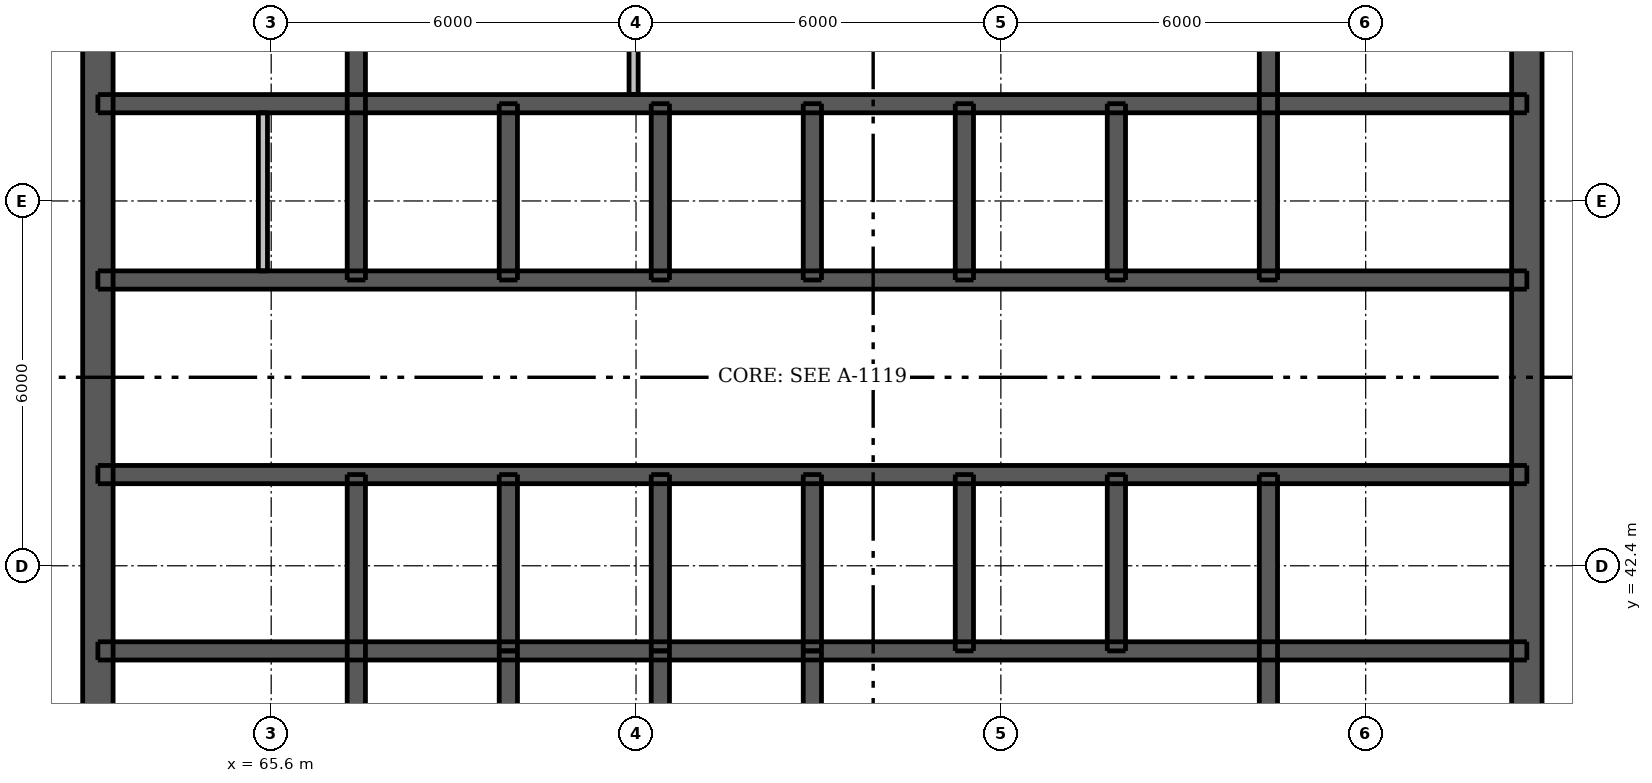
"""IFC4 building model, lengths in metres.
Left out: names, types, materials, properties, quantities, classifications, styles, units other than length and angle.
Written with IfcOpenShell. Run it as: python <this file> out.ifc"""

import sys

from ifc_helpers import new_model, si_unit, direction, frame, frame_2d, origin, place, context, subcontext, project, spatial, rectangle, extrude, element, fill, save


model = new_model("IFC4")
c1 = context("Model", 3, precision=1e-05, world=origin(), true_north=direction((0.0, 1.0)))
c2 = subcontext(c1, "Body", "Model", "MODEL_VIEW")
j1 = project(units=[si_unit("LENGTHUNIT", "METRE"), si_unit("PLANEANGLEUNIT", "RADIAN")], contexts=[c1])
p1 = place(None, origin())
s1 = spatial("IfcSite", under=j1, at=p1, CompositionType="ELEMENT")
p2 = place(p1, origin())
s2 = spatial("IfcBuilding", under=s1, at=p2, CompositionType="ELEMENT")
p3 = place(p2, frame((0.0, 0.0, 268.6)))
s3 = spatial("IfcBuildingStorey", under=s2, at=p3, CompositionType="ELEMENT", Elevation=268.6)
p4 = place(p3, frame((62.75, 33.5, 0.0), z_axis=(0.0, 0.0, 1.0), x_axis=(0.0, 1.0, 0.0)))
e1 = element("IfcWall", 1, at=p4, inside=s3, PredefinedType="SHEAR", context=c2, shape_type="SweptSolid", body=[
    extrude(rectangle(XDim=24.0, YDim=0.5, at=frame_2d((12.0, 0.0))), origin(), (0.0, 0.0, 1.0), 3.05),
])
p5 = place(p4, frame((11.2, 0.0, 0.0)))
e2 = element("IfcOpeningElement", 2, at=p5, cuts=e1, PredefinedType="OPENING", context=c2, shape_type="SweptSolid", body=[
    extrude(rectangle(XDim=1.6, YDim=2.1, at=frame_2d((0.8, 1.05))), frame((0.0, 0.26, 0.0), z_axis=(0.0, -1.0, 0.0), x_axis=(1.0, 0.0, 0.0)), (0.0, 0.0, 1.0), 0.52),
])
p6 = place(p3, frame((86.25, 33.5, 0.0), z_axis=(0.0, 0.0, 1.0), x_axis=(0.0, 1.0, 0.0)))
e3 = element("IfcWall", 3, at=p6, inside=s3, PredefinedType="SHEAR", context=c2, shape_type="SweptSolid", body=[
    extrude(rectangle(XDim=24.0, YDim=0.5, at=frame_2d((12.0, 0.0))), origin(), (0.0, 0.0, 1.0), 3.05),
])
p7 = place(p6, frame((11.2, 0.0, 0.0)))
e4 = element("IfcOpeningElement", 4, at=p7, cuts=e3, PredefinedType="OPENING", context=c2, shape_type="SweptSolid", body=[
    extrude(rectangle(XDim=1.6, YDim=2.1, at=frame_2d((0.8, 1.05))), frame((0.0, 0.26, 0.0), z_axis=(0.0, -1.0, 0.0), x_axis=(1.0, 0.0, 0.0)), (0.0, 0.0, 1.0), 0.52),
])
p8 = place(p3, frame((62.75, 41.0, 0.0), z_axis=(0.0, 0.0, 1.0), x_axis=(1.0, 0.0, 0.0)))
e5 = element("IfcWall", 5, at=p8, inside=s3, PredefinedType="SHEAR", context=c2, shape_type="SweptSolid", body=[
    extrude(rectangle(XDim=23.5, YDim=0.3, at=frame_2d((11.75, 0.0))), origin(), (0.0, 0.0, 1.0), 3.05),
])
p9 = place(p3, frame((62.75, 43.9, 0.0), z_axis=(0.0, 0.0, 1.0), x_axis=(1.0, 0.0, 0.0)))
e6 = element("IfcWall", 6, at=p9, inside=s3, PredefinedType="SHEAR", context=c2, shape_type="SweptSolid", body=[
    extrude(rectangle(XDim=23.5, YDim=0.3, at=frame_2d((11.75, 0.0))), origin(), (0.0, 0.0, 1.0), 3.05),
])
p10 = place(p9, frame((1.725, 0.0, 0.0)))
e7 = element("IfcOpeningElement", 7, at=p10, cuts=e6, PredefinedType="OPENING", context=c2, shape_type="SweptSolid", body=[
    extrude(rectangle(XDim=0.9, YDim=2.1, at=frame_2d((0.45, 1.05))), frame((0.0, 0.16, 0.0), z_axis=(0.0, -1.0, 0.0), x_axis=(1.0, 0.0, 0.0)), (0.0, 0.0, 1.0), 0.32),
])
p11 = place(p9, frame((20.875, 0.0, 0.0)))
e8 = element("IfcOpeningElement", 8, at=p11, cuts=e6, PredefinedType="OPENING", context=c2, shape_type="SweptSolid", body=[
    extrude(rectangle(XDim=0.9, YDim=2.1, at=frame_2d((0.45, 1.05))), frame((0.0, 0.16, 0.0), z_axis=(0.0, -1.0, 0.0), x_axis=(1.0, 0.0, 0.0)), (0.0, 0.0, 1.0), 0.32),
])
p12 = place(p9, frame((7.55, 0.0, 0.0)))
e9 = element("IfcOpeningElement", 9, at=p12, cuts=e6, PredefinedType="OPENING", context=c2, shape_type="SweptSolid", body=[
    extrude(rectangle(XDim=0.9, YDim=2.1, at=frame_2d((0.45, 1.05))), frame((0.0, 0.16, 0.0), z_axis=(0.0, -1.0, 0.0), x_axis=(1.0, 0.0, 0.0)), (0.0, 0.0, 1.0), 0.32),
])
p13 = place(p9, frame((10.05, 0.0, 0.0)))
e10 = element("IfcOpeningElement", 10, at=p13, cuts=e6, PredefinedType="OPENING", context=c2, shape_type="SweptSolid", body=[
    extrude(rectangle(XDim=0.9, YDim=2.1, at=frame_2d((0.45, 1.05))), frame((0.0, 0.16, 0.0), z_axis=(0.0, -1.0, 0.0), x_axis=(1.0, 0.0, 0.0)), (0.0, 0.0, 1.0), 0.32),
])
p14 = place(p9, frame((15.05, 0.0, 0.0)))
e11 = element("IfcOpeningElement", 11, at=p14, cuts=e6, PredefinedType="OPENING", context=c2, shape_type="SweptSolid", body=[
    extrude(rectangle(XDim=0.9, YDim=2.1, at=frame_2d((0.45, 1.05))), frame((0.0, 0.16, 0.0), z_axis=(0.0, -1.0, 0.0), x_axis=(1.0, 0.0, 0.0)), (0.0, 0.0, 1.0), 0.32),
])
p15 = place(p9, frame((17.55, 0.0, 0.0)))
e12 = element("IfcOpeningElement", 12, at=p15, cuts=e6, PredefinedType="OPENING", context=c2, shape_type="SweptSolid", body=[
    extrude(rectangle(XDim=0.9, YDim=2.1, at=frame_2d((0.45, 1.05))), frame((0.0, 0.16, 0.0), z_axis=(0.0, -1.0, 0.0), x_axis=(1.0, 0.0, 0.0)), (0.0, 0.0, 1.0), 0.32),
])
p16 = place(p3, frame((62.75, 47.1, 0.0), z_axis=(0.0, 0.0, 1.0), x_axis=(1.0, 0.0, 0.0)))
e13 = element("IfcWall", 13, at=p16, inside=s3, PredefinedType="SHEAR", context=c2, shape_type="SweptSolid", body=[
    extrude(rectangle(XDim=23.5, YDim=0.3, at=frame_2d((11.75, 0.0))), origin(), (0.0, 0.0, 1.0), 3.05),
])
p17 = place(p16, frame((1.032, 0.0, 0.0)))
e14 = element("IfcOpeningElement", 14, at=p17, cuts=e13, PredefinedType="OPENING", context=c2, shape_type="SweptSolid", body=[
    extrude(rectangle(XDim=0.9, YDim=2.1, at=frame_2d((0.45, 1.05))), frame((0.0, 0.16, 0.0), z_axis=(0.0, -1.0, 0.0), x_axis=(1.0, 0.0, 0.0)), (0.0, 0.0, 1.0), 0.32),
])
p18 = place(p16, frame((3.007, 0.0, 0.0)))
e15 = element("IfcOpeningElement", 15, at=p18, cuts=e13, PredefinedType="OPENING", context=c2, shape_type="SweptSolid", body=[
    extrude(rectangle(XDim=0.8, YDim=2.1, at=frame_2d((0.4, 1.05))), frame((0.0, 0.16, 0.0), z_axis=(0.0, -1.0, 0.0), x_axis=(1.0, 0.0, 0.0)), (0.0, 0.0, 1.0), 0.32),
])
p19 = place(p16, frame((20.875, 0.0, 0.0)))
e16 = element("IfcOpeningElement", 16, at=p19, cuts=e13, PredefinedType="OPENING", context=c2, shape_type="SweptSolid", body=[
    extrude(rectangle(XDim=0.9, YDim=2.1, at=frame_2d((0.45, 1.05))), frame((0.0, 0.16, 0.0), z_axis=(0.0, -1.0, 0.0), x_axis=(1.0, 0.0, 0.0)), (0.0, 0.0, 1.0), 0.32),
])
p20 = place(p16, frame((4.95, 0.0, 0.0)))
e17 = element("IfcOpeningElement", 17, at=p20, cuts=e13, PredefinedType="OPENING", context=c2, shape_type="SweptSolid", body=[
    extrude(rectangle(XDim=1.1, YDim=2.1, at=frame_2d((0.55, 1.05))), frame((0.0, 0.16, 0.0), z_axis=(0.0, -1.0, 0.0), x_axis=(1.0, 0.0, 0.0)), (0.0, 0.0, 1.0), 0.32),
])
p21 = place(p16, frame((7.45, 0.0, 0.0)))
e18 = element("IfcOpeningElement", 18, at=p21, cuts=e13, PredefinedType="OPENING", context=c2, shape_type="SweptSolid", body=[
    extrude(rectangle(XDim=1.1, YDim=2.1, at=frame_2d((0.55, 1.05))), frame((0.0, 0.16, 0.0), z_axis=(0.0, -1.0, 0.0), x_axis=(1.0, 0.0, 0.0)), (0.0, 0.0, 1.0), 0.32),
])
p22 = place(p16, frame((9.95, 0.0, 0.0)))
e19 = element("IfcOpeningElement", 19, at=p22, cuts=e13, PredefinedType="OPENING", context=c2, shape_type="SweptSolid", body=[
    extrude(rectangle(XDim=1.1, YDim=2.1, at=frame_2d((0.55, 1.05))), frame((0.0, 0.16, 0.0), z_axis=(0.0, -1.0, 0.0), x_axis=(1.0, 0.0, 0.0)), (0.0, 0.0, 1.0), 0.32),
])
p23 = place(p16, frame((12.45, 0.0, 0.0)))
e20 = element("IfcOpeningElement", 20, at=p23, cuts=e13, PredefinedType="OPENING", context=c2, shape_type="SweptSolid", body=[
    extrude(rectangle(XDim=1.1, YDim=2.1, at=frame_2d((0.55, 1.05))), frame((0.0, 0.16, 0.0), z_axis=(0.0, -1.0, 0.0), x_axis=(1.0, 0.0, 0.0)), (0.0, 0.0, 1.0), 0.32),
])
p24 = place(p16, frame((14.95, 0.0, 0.0)))
e21 = element("IfcOpeningElement", 21, at=p24, cuts=e13, PredefinedType="OPENING", context=c2, shape_type="SweptSolid", body=[
    extrude(rectangle(XDim=1.1, YDim=2.1, at=frame_2d((0.55, 1.05))), frame((0.0, 0.16, 0.0), z_axis=(0.0, -1.0, 0.0), x_axis=(1.0, 0.0, 0.0)), (0.0, 0.0, 1.0), 0.32),
])
p25 = place(p16, frame((17.45, 0.0, 0.0)))
e22 = element("IfcOpeningElement", 22, at=p25, cuts=e13, PredefinedType="OPENING", context=c2, shape_type="SweptSolid", body=[
    extrude(rectangle(XDim=1.1, YDim=2.1, at=frame_2d((0.55, 1.05))), frame((0.0, 0.16, 0.0), z_axis=(0.0, -1.0, 0.0), x_axis=(1.0, 0.0, 0.0)), (0.0, 0.0, 1.0), 0.32),
])
p26 = place(p3, frame((62.75, 50.0, 0.0), z_axis=(0.0, 0.0, 1.0), x_axis=(1.0, 0.0, 0.0)))
e23 = element("IfcWall", 23, at=p26, inside=s3, PredefinedType="SHEAR", context=c2, shape_type="SweptSolid", body=[
    extrude(rectangle(XDim=23.5, YDim=0.3, at=frame_2d((11.75, 0.0))), origin(), (0.0, 0.0, 1.0), 3.05),
])
p27 = place(p3, frame((67.0, 33.75, 0.0), z_axis=(0.0, 0.0, 1.0), x_axis=(0.0, 1.0, 0.0)))
e24 = element("IfcWall", 24, at=p27, inside=s3, PredefinedType="SHEAR", context=c2, shape_type="SweptSolid", body=[
    extrude(rectangle(XDim=10.15, YDim=0.3, at=frame_2d((5.075, 0.0))), origin(), (0.0, 0.0, 1.0), 3.05),
])
p28 = place(p27, frame((0.45, 0.0, 0.0)))
e25 = element("IfcOpeningElement", 25, at=p28, cuts=e24, PredefinedType="OPENING", context=c2, shape_type="SweptSolid", body=[
    extrude(rectangle(XDim=1.1, YDim=2.1, at=frame_2d((0.55, 1.05))), frame((0.0, 0.16, 0.0), z_axis=(0.0, -1.0, 0.0), x_axis=(1.0, 0.0, 0.0)), (0.0, 0.0, 1.0), 0.32),
])
for number, where, z_axis, x_axis in (
    (26, (67.0, 47.1, 0.0), (0.0, 0.0, 1.0), (0.0, 1.0, 0.0)),
    (27, (82.0, 33.75, 0.0), (0.0, 0.0, 1.0), (0.0, 1.0, 0.0)),
    (28, (82.0, 47.1, 0.0), (0.0, 0.0, 1.0), (0.0, 1.0, 0.0)),
):
    element("IfcWall", number, at=place(p3, frame(where, z_axis=z_axis, x_axis=x_axis)), inside=s3, PredefinedType="SHEAR", context=c2, shape_type="SweptSolid", body=[
        extrude(rectangle(XDim=10.15, YDim=0.3, at=frame_2d((5.075, 0.0))), origin(), (0.0, 0.0, 1.0), 3.05),
    ])
for number, where, z_axis, x_axis in (
    (29, (69.5, 41.0, 0.0), (0.0, 0.0, 1.0), (0.0, 1.0, 0.0)),
    (30, (69.5, 47.1, 0.0), (0.0, 0.0, 1.0), (0.0, 1.0, 0.0)),
    (31, (72.0, 41.0, 0.0), (0.0, 0.0, 1.0), (0.0, 1.0, 0.0)),
    (32, (72.0, 47.1, 0.0), (0.0, 0.0, 1.0), (0.0, 1.0, 0.0)),
    (33, (74.5, 41.0, 0.0), (0.0, 0.0, 1.0), (0.0, 1.0, 0.0)),
    (34, (74.5, 47.1, 0.0), (0.0, 0.0, 1.0), (0.0, 1.0, 0.0)),
    (35, (77.0, 41.0, 0.0), (0.0, 0.0, 1.0), (0.0, 1.0, 0.0)),
    (36, (77.0, 47.1, 0.0), (0.0, 0.0, 1.0), (0.0, 1.0, 0.0)),
    (37, (79.5, 41.0, 0.0), (0.0, 0.0, 1.0), (0.0, 1.0, 0.0)),
    (38, (79.5, 47.1, 0.0), (0.0, 0.0, 1.0), (0.0, 1.0, 0.0)),
    (39, (69.5, 38.1, 0.0), (0.0, 0.0, 1.0), (0.0, 1.0, 0.0)),
    (40, (72.0, 38.1, 0.0), (0.0, 0.0, 1.0), (0.0, 1.0, 0.0)),
    (41, (74.5, 38.1, 0.0), (0.0, 0.0, 1.0), (0.0, 1.0, 0.0)),
):
    element("IfcWall", number, at=place(p3, frame(where, z_axis=z_axis, x_axis=x_axis)), inside=s3, PredefinedType="SHEAR", context=c2, shape_type="SweptSolid", body=[
        extrude(rectangle(XDim=2.9, YDim=0.3, at=frame_2d((1.45, 0.0))), origin(), (0.0, 0.0, 1.0), 3.05),
    ])
p29 = place(p3, frame((65.464, 47.25, 0.0), z_axis=(0.0, 0.0, 1.0), x_axis=(0.0, 1.0, 0.0)))
e42 = element("IfcWall", 42, at=p29, inside=s3, PredefinedType="PLUMBINGWALL", context=c2, shape_type="SweptSolid", body=[
    extrude(rectangle(XDim=2.6, YDim=0.15, at=frame_2d((1.3, 0.0))), origin(), (0.0, 0.0, 1.0), 3.05),
])
p30 = place(p3, frame((71.56, 50.15, 0.0), z_axis=(0.0, 0.0, 1.0), x_axis=(0.0, 1.0, 0.0)))
e43 = element("IfcWall", 43, at=p30, inside=s3, PredefinedType="PLUMBINGWALL", context=c2, shape_type="SweptSolid", body=[
    extrude(rectangle(XDim=6.85, YDim=0.15, at=frame_2d((3.425, 0.0))), origin(), (0.0, 0.0, 1.0), 3.05),
])
p31 = place(p5, origin())
e44 = element("IfcDoor", 44, at=p31, inside=s3, OperationType="DOUBLE_DOOR_SINGLE_SWING", PredefinedType="DOOR", context=c2, shape_type="SweptSolid", body=[
    extrude(rectangle(XDim=1.6, YDim=2.1, at=frame_2d((0.8, 1.05))), frame((0.0, -0.188, 0.0), z_axis=(0.0, -1.0, 0.0), x_axis=(1.0, 0.0, 0.0)), (0.0, 0.0, 1.0), 0.05),
])
fill(e2, e44)
p32 = place(p7, origin())
e45 = element("IfcDoor", 45, at=p32, inside=s3, OperationType="DOUBLE_DOOR_SINGLE_SWING", PredefinedType="DOOR", context=c2, shape_type="SweptSolid", body=[
    extrude(rectangle(XDim=1.6, YDim=2.1, at=frame_2d((0.8, 1.05))), frame((0.0, 0.237, 0.0), z_axis=(0.0, -1.0, 0.0), x_axis=(1.0, 0.0, 0.0)), (0.0, 0.0, 1.0), 0.05),
])
fill(e4, e45)
p33 = place(p10, origin())
e46 = element("IfcDoor", 46, at=p33, inside=s3, OperationType="SINGLE_SWING_LEFT", PredefinedType="DOOR", context=c2, shape_type="SweptSolid", body=[
    extrude(rectangle(XDim=0.9, YDim=2.1, at=frame_2d((0.45, 1.05))), frame((0.0, -0.087, 0.0), z_axis=(0.0, -1.0, 0.0), x_axis=(1.0, 0.0, 0.0)), (0.0, 0.0, 1.0), 0.05),
])
fill(e7, e46)
p34 = place(p11, origin())
e47 = element("IfcDoor", 47, at=p34, inside=s3, OperationType="SINGLE_SWING_LEFT", PredefinedType="DOOR", context=c2, shape_type="SweptSolid", body=[
    extrude(rectangle(XDim=0.9, YDim=2.1, at=frame_2d((0.45, 1.05))), frame((0.0, -0.087, 0.0), z_axis=(0.0, -1.0, 0.0), x_axis=(1.0, 0.0, 0.0)), (0.0, 0.0, 1.0), 0.05),
])
fill(e8, e47)
p35 = place(p17, origin())
e48 = element("IfcDoor", 48, at=p35, inside=s3, OperationType="SINGLE_SWING_LEFT", PredefinedType="DOOR", context=c2, shape_type="SweptSolid", body=[
    extrude(rectangle(XDim=0.9, YDim=2.1, at=frame_2d((0.45, 1.05))), frame((0.0, 0.138, 0.0), z_axis=(0.0, -1.0, 0.0), x_axis=(1.0, 0.0, 0.0)), (0.0, 0.0, 1.0), 0.05),
])
fill(e14, e48)
p36 = place(p18, origin())
e49 = element("IfcDoor", 49, at=p36, inside=s3, OperationType="SINGLE_SWING_RIGHT", PredefinedType="DOOR", context=c2, shape_type="SweptSolid", body=[
    extrude(rectangle(XDim=0.8, YDim=2.1, at=frame_2d((0.4, 1.05))), frame((0.0, 0.138, 0.0), z_axis=(0.0, -1.0, 0.0), x_axis=(1.0, 0.0, 0.0)), (0.0, 0.0, 1.0), 0.05),
])
fill(e15, e49)
p37 = place(p19, origin())
e50 = element("IfcDoor", 50, at=p37, inside=s3, OperationType="SINGLE_SWING_LEFT", PredefinedType="DOOR", context=c2, shape_type="SweptSolid", body=[
    extrude(rectangle(XDim=0.9, YDim=2.1, at=frame_2d((0.45, 1.05))), frame((0.0, 0.138, 0.0), z_axis=(0.0, -1.0, 0.0), x_axis=(1.0, 0.0, 0.0)), (0.0, 0.0, 1.0), 0.05),
])
fill(e16, e50)
p38 = place(p12, origin())
e51 = element("IfcDoor", 51, at=p38, inside=s3, OperationType="SINGLE_SWING_LEFT", PredefinedType="DOOR", context=c2, shape_type="SweptSolid", body=[
    extrude(rectangle(XDim=0.9, YDim=2.1, at=frame_2d((0.45, 1.05))), frame((0.0, -0.087, 0.0), z_axis=(0.0, -1.0, 0.0), x_axis=(1.0, 0.0, 0.0)), (0.0, 0.0, 1.0), 0.05),
])
fill(e9, e51)
p39 = place(p13, origin())
e52 = element("IfcDoor", 52, at=p39, inside=s3, OperationType="SINGLE_SWING_RIGHT", PredefinedType="DOOR", context=c2, shape_type="SweptSolid", body=[
    extrude(rectangle(XDim=0.9, YDim=2.1, at=frame_2d((0.45, 1.05))), frame((0.0, -0.087, 0.0), z_axis=(0.0, -1.0, 0.0), x_axis=(1.0, 0.0, 0.0)), (0.0, 0.0, 1.0), 0.05),
])
fill(e10, e52)
p40 = place(p14, origin())
e53 = element("IfcDoor", 53, at=p40, inside=s3, OperationType="SINGLE_SWING_RIGHT", PredefinedType="DOOR", context=c2, shape_type="SweptSolid", body=[
    extrude(rectangle(XDim=0.9, YDim=2.1, at=frame_2d((0.45, 1.05))), frame((0.0, -0.087, 0.0), z_axis=(0.0, -1.0, 0.0), x_axis=(1.0, 0.0, 0.0)), (0.0, 0.0, 1.0), 0.05),
])
fill(e11, e53)
p41 = place(p15, origin())
e54 = element("IfcDoor", 54, at=p41, inside=s3, OperationType="SINGLE_SWING_LEFT", PredefinedType="DOOR", context=c2, shape_type="SweptSolid", body=[
    extrude(rectangle(XDim=0.9, YDim=2.1, at=frame_2d((0.45, 1.05))), frame((0.0, -0.087, 0.0), z_axis=(0.0, -1.0, 0.0), x_axis=(1.0, 0.0, 0.0)), (0.0, 0.0, 1.0), 0.05),
])
fill(e12, e54)
p42 = place(p20, origin())
e55 = element("IfcDoor", 55, at=p42, inside=s3, OperationType="DOUBLE_DOOR_SLIDING", PredefinedType="DOOR", context=c2, shape_type="SweptSolid", body=[
    extrude(rectangle(XDim=1.1, YDim=2.1, at=frame_2d((0.55, 1.05))), frame((0.0, 0.025, 0.0), z_axis=(0.0, -1.0, 0.0), x_axis=(1.0, 0.0, 0.0)), (0.0, 0.0, 1.0), 0.05),
])
fill(e17, e55)
p43 = place(p21, origin())
e56 = element("IfcDoor", 56, at=p43, inside=s3, OperationType="DOUBLE_DOOR_SLIDING", PredefinedType="DOOR", context=c2, shape_type="SweptSolid", body=[
    extrude(rectangle(XDim=1.1, YDim=2.1, at=frame_2d((0.55, 1.05))), frame((0.0, 0.025, 0.0), z_axis=(0.0, -1.0, 0.0), x_axis=(1.0, 0.0, 0.0)), (0.0, 0.0, 1.0), 0.05),
])
fill(e18, e56)
p44 = place(p22, origin())
e57 = element("IfcDoor", 57, at=p44, inside=s3, OperationType="DOUBLE_DOOR_SLIDING", PredefinedType="DOOR", context=c2, shape_type="SweptSolid", body=[
    extrude(rectangle(XDim=1.1, YDim=2.1, at=frame_2d((0.55, 1.05))), frame((0.0, 0.025, 0.0), z_axis=(0.0, -1.0, 0.0), x_axis=(1.0, 0.0, 0.0)), (0.0, 0.0, 1.0), 0.05),
])
fill(e19, e57)
p45 = place(p23, origin())
e58 = element("IfcDoor", 58, at=p45, inside=s3, OperationType="DOUBLE_DOOR_SLIDING", PredefinedType="DOOR", context=c2, shape_type="SweptSolid", body=[
    extrude(rectangle(XDim=1.1, YDim=2.1, at=frame_2d((0.55, 1.05))), frame((0.0, 0.025, 0.0), z_axis=(0.0, -1.0, 0.0), x_axis=(1.0, 0.0, 0.0)), (0.0, 0.0, 1.0), 0.05),
])
fill(e20, e58)
p46 = place(p24, origin())
e59 = element("IfcDoor", 59, at=p46, inside=s3, OperationType="DOUBLE_DOOR_SLIDING", PredefinedType="DOOR", context=c2, shape_type="SweptSolid", body=[
    extrude(rectangle(XDim=1.1, YDim=2.1, at=frame_2d((0.55, 1.05))), frame((0.0, 0.025, 0.0), z_axis=(0.0, -1.0, 0.0), x_axis=(1.0, 0.0, 0.0)), (0.0, 0.0, 1.0), 0.05),
])
fill(e21, e59)
p47 = place(p25, origin())
e60 = element("IfcDoor", 60, at=p47, inside=s3, OperationType="DOUBLE_DOOR_SLIDING", PredefinedType="DOOR", context=c2, shape_type="SweptSolid", body=[
    extrude(rectangle(XDim=1.1, YDim=2.1, at=frame_2d((0.55, 1.05))), frame((0.0, 0.025, 0.0), z_axis=(0.0, -1.0, 0.0), x_axis=(1.0, 0.0, 0.0)), (0.0, 0.0, 1.0), 0.05),
])
fill(e22, e60)
save(model, sys.argv[1])
